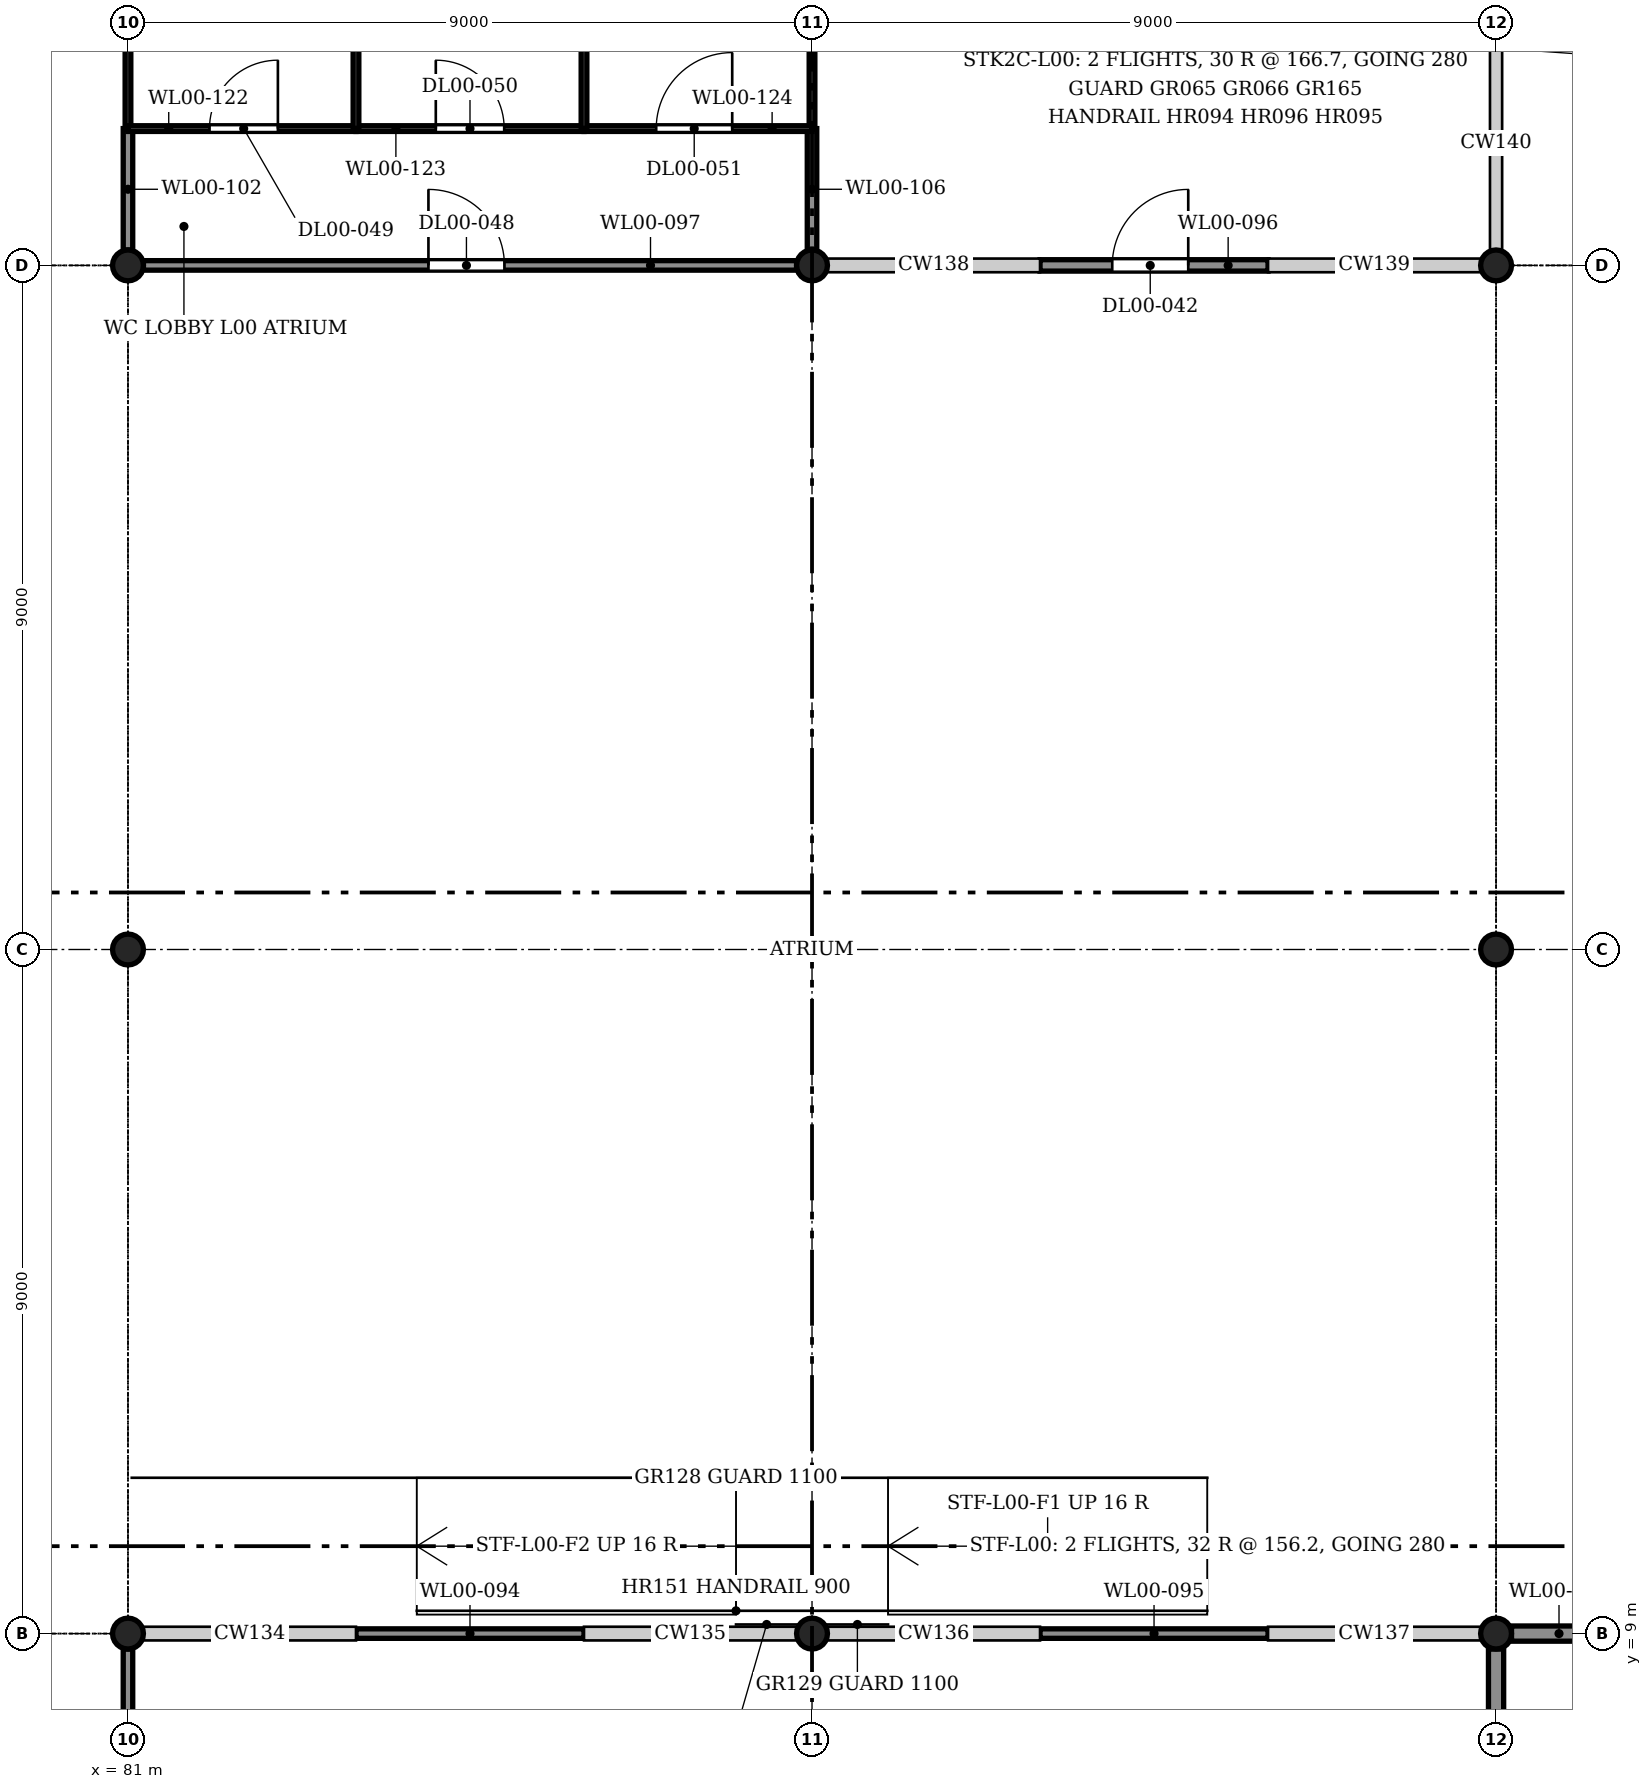
"""IFC4 building model, lengths in metres.
Left out: names, types, materials, properties, quantities, classifications, styles, units other than length and angle.
Written with IfcOpenShell. Run it as: python <this file> out.ifc"""

import sys

from ifc_helpers import new_model, si_unit, direction, frame, frame_2d, origin, origin_2d, place, context, subcontext, project, spatial, rectangle, hollow_circle, extrude, element, fill, save


model = new_model("IFC4")
c1 = context("Model", 3, precision=1e-05, world=origin(), true_north=direction((0.0, 1.0)))
c2 = subcontext(c1, "Body", "Model", "MODEL_VIEW")
j1 = project(units=[si_unit("LENGTHUNIT", "METRE"), si_unit("PLANEANGLEUNIT", "RADIAN")], contexts=[c1])
p1 = place(None, origin())
s1 = spatial("IfcSite", under=j1, at=p1, CompositionType="ELEMENT")
p2 = place(p1, origin())
s2 = spatial("IfcBuilding", under=s1, at=p2, CompositionType="ELEMENT")
p3 = place(p2, origin())
s3 = spatial("IfcBuildingStorey", under=s2, at=p3, CompositionType="ELEMENT", Elevation=0.0)
for number, where, z_axis, x_axis in (
    (1, (81.0, 9.0, 0.0), (0.0, 0.0, 1.0), (1.0, 0.0, 0.0)),
    (2, (90.0, 9.0, 0.0), (0.0, 0.0, 1.0), (1.0, 0.0, 0.0)),
    (3, (99.0, 9.0, 0.0), (0.0, 0.0, 1.0), (1.0, 0.0, 0.0)),
    (4, (81.0, 18.0, 0.0), (0.0, 0.0, 1.0), (1.0, 0.0, 0.0)),
    (5, (99.0, 18.0, 0.0), (0.0, 0.0, 1.0), (1.0, 0.0, 0.0)),
    (6, (81.0, 27.0, 0.0), (0.0, 0.0, 1.0), (1.0, 0.0, 0.0)),
    (7, (90.0, 27.0, 0.0), (0.0, 0.0, 1.0), (1.0, 0.0, 0.0)),
    (8, (99.0, 27.0, 0.0), (0.0, 0.0, 1.0), (1.0, 0.0, 0.0)),
):
    element("IfcColumn", number, at=place(p3, frame(where, z_axis=z_axis, x_axis=x_axis)), inside=s3, PredefinedType="COLUMN", context=c2, shape_type="SweptSolid", body=[
        extrude(hollow_circle(Radius=0.203, WallThickness=0.013, at=origin_2d()), origin(), (0.0, 0.0, 1.0), 5.0),
    ])
for number, where, z_axis, x_axis in (
    (9, (84.0, 9.0, 0.0), (0.0, 0.0, 1.0), (1.0, 0.0, 0.0)),
    (10, (93.0, 9.0, 0.0), (0.0, 0.0, 1.0), (1.0, 0.0, 0.0)),
):
    element("IfcWall", number, at=place(p3, frame(where, z_axis=z_axis, x_axis=x_axis)), inside=s3, PredefinedType="PARTITIONING", context=c2, shape_type="SweptSolid", body=[
        extrude(rectangle(XDim=3.0, YDim=0.125, at=frame_2d((1.5, 0.0))), origin(), (0.0, 0.0, 1.0), 4.228),
    ])
p4 = place(p3, frame((93.0, 27.0, 0.0), z_axis=(0.0, 0.0, 1.0), x_axis=(1.0, 0.0, 0.0)))
e11 = element("IfcWall", 11, at=p4, inside=s3, PredefinedType="PARTITIONING", context=c2, shape_type="SweptSolid", body=[
    extrude(rectangle(XDim=3.0, YDim=0.15, at=frame_2d((1.5, 0.0))), origin(), (0.0, 0.0, 1.0), 4.228),
])
p5 = place(p4, frame((0.95, 0.0, 0.0)))
e12 = element("IfcOpeningElement", 12, at=p5, cuts=e11, PredefinedType="OPENING", context=c2, shape_type="SweptSolid", body=[
    extrude(rectangle(XDim=1.0, YDim=2.1, at=frame_2d((0.5, 1.05))), frame((0.0, 0.085, 0.0), z_axis=(0.0, -1.0, 0.0), x_axis=(1.0, 0.0, 0.0)), (0.0, 0.0, 1.0), 0.17),
])
p6 = place(p3, frame((81.203, 27.0, 0.0), z_axis=(0.0, 0.0, 1.0), x_axis=(1.0, 0.0, 0.0)))
e13 = element("IfcWall", 13, at=p6, inside=s3, PredefinedType="PARTITIONING", context=c2, shape_type="SweptSolid", body=[
    extrude(rectangle(XDim=8.594, YDim=0.125, at=frame_2d((4.297, 0.0))), origin(), (0.0, 0.0, 1.0), 4.228),
])
p7 = place(p6, frame((3.75, 0.0, 0.0)))
e14 = element("IfcOpeningElement", 14, at=p7, cuts=e13, PredefinedType="OPENING", context=c2, shape_type="SweptSolid", body=[
    extrude(rectangle(XDim=1.0, YDim=2.1, at=frame_2d((0.5, 1.05))), frame((0.0, 0.073, 0.0), z_axis=(0.0, -1.0, 0.0), x_axis=(1.0, 0.0, 0.0)), (0.0, 0.0, 1.0), 0.145),
])
p8 = place(p3, frame((99.203, 9.0, 0.0), z_axis=(0.0, 0.0, 1.0), x_axis=(1.0, 0.0, 0.0)))
e15 = element("IfcWall", 15, at=p8, inside=s3, PredefinedType="PARTITIONING", context=c2, shape_type="SweptSolid", body=[
    extrude(rectangle(XDim=4.297, YDim=0.2, at=frame_2d((2.148, 0.0))), origin(), (0.0, 0.0, 1.0), 4.302),
])
p9 = place(p8, frame((1.25, 0.0, 0.0)))
e16 = element("IfcOpeningElement", 16, at=p9, cuts=e15, PredefinedType="OPENING", context=c2, shape_type="SweptSolid", body=[
    extrude(rectangle(XDim=1.8, YDim=2.1, at=frame_2d((0.9, 1.05))), frame((0.0, 0.11, 0.0), z_axis=(0.0, -1.0, 0.0), x_axis=(1.0, 0.0, 0.0)), (0.0, 0.0, 1.0), 0.22),
])
p10 = place(p3, frame((81.0, 0.175, 0.0), z_axis=(0.0, 0.0, 1.0), x_axis=(0.0, 1.0, 0.0)))
e17 = element("IfcWall", 17, at=p10, inside=s3, PredefinedType="PARTITIONING", context=c2, shape_type="SweptSolid", body=[
    extrude(rectangle(XDim=8.622, YDim=0.125, at=frame_2d((4.311, 0.0))), origin(), (0.0, 0.0, 1.0), 4.302),
])
p11 = place(p10, frame((2.05, 0.0, 0.0)))
e18 = element("IfcOpeningElement", 18, at=p11, cuts=e17, PredefinedType="OPENING", context=c2, shape_type="SweptSolid", body=[
    extrude(rectangle(XDim=1.0, YDim=2.1, at=frame_2d((0.5, 1.05))), frame((0.0, 0.073, 0.0), z_axis=(0.0, -1.0, 0.0), x_axis=(1.0, 0.0, 0.0)), (0.0, 0.0, 1.0), 0.145),
])
p12 = place(p3, frame((99.0, 0.175, 0.0), z_axis=(0.0, 0.0, 1.0), x_axis=(0.0, 1.0, 0.0)))
e19 = element("IfcWall", 19, at=p12, inside=s3, PredefinedType="PARTITIONING", context=c2, shape_type="SweptSolid", body=[
    extrude(rectangle(XDim=8.622, YDim=0.2, at=frame_2d((4.311, 0.0))), origin(), (0.0, 0.0, 1.0), 4.302),
])
p13 = place(p3, frame((81.0, 27.203, 0.0), z_axis=(0.0, 0.0, 1.0), x_axis=(0.0, 1.0, 0.0)))
e20 = element("IfcWall", 20, at=p13, inside=s3, PredefinedType="PARTITIONING", context=c2, shape_type="SweptSolid", body=[
    extrude(rectangle(XDim=1.597, YDim=0.125, at=frame_2d((0.798, 0.0))), origin(), (0.0, 0.0, 1.0), 4.302),
])
p14 = place(p3, frame((81.0, 28.8, 0.0), z_axis=(0.0, 0.0, 1.0), x_axis=(0.0, 1.0, 0.0)))
e21 = element("IfcWall", 21, at=p14, inside=s3, PredefinedType="PARTITIONING", context=c2, shape_type="SweptSolid", body=[
    extrude(rectangle(XDim=7.031, YDim=0.075, at=frame_2d((3.515, 0.0))), origin(), (0.0, 0.0, 1.0), 4.302),
])
p15 = place(p3, frame((90.0, 27.203, 0.0), z_axis=(0.0, 0.0, 1.0), x_axis=(0.0, 1.0, 0.0)))
e22 = element("IfcWall", 22, at=p15, inside=s3, PredefinedType="PARTITIONING", context=c2, shape_type="SweptSolid", body=[
    extrude(rectangle(XDim=1.597, YDim=0.125, at=frame_2d((0.798, 0.0))), origin(), (0.0, 0.0, 1.0), 4.302),
])
p16 = place(p3, frame((90.0, 28.8, 0.0), z_axis=(0.0, 0.0, 1.0), x_axis=(0.0, 1.0, 0.0)))
e23 = element("IfcWall", 23, at=p16, inside=s3, PredefinedType="PARTITIONING", context=c2, shape_type="SweptSolid", body=[
    extrude(rectangle(XDim=7.036, YDim=0.075, at=frame_2d((3.518, 0.0))), origin(), (0.0, 0.0, 1.0), 4.302),
])
p17 = place(p3, frame((81.0, 28.8, 0.0), z_axis=(0.0, 0.0, 1.0), x_axis=(1.0, 0.0, 0.0)))
e24 = element("IfcWall", 24, at=p17, inside=s3, PredefinedType="PARTITIONING", context=c2, shape_type="SweptSolid", body=[
    extrude(rectangle(XDim=3.0, YDim=0.075, at=frame_2d((1.5, 0.0))), origin(), (0.0, 0.0, 1.0), 4.302),
])
p18 = place(p17, frame((1.073, 0.0, 0.0)))
e25 = element("IfcOpeningElement", 25, at=p18, cuts=e24, PredefinedType="OPENING", context=c2, shape_type="SweptSolid", body=[
    extrude(rectangle(XDim=0.9, YDim=2.1, at=frame_2d((0.45, 1.05))), frame((0.0, 0.047, 0.0), z_axis=(0.0, -1.0, 0.0), x_axis=(1.0, 0.0, 0.0)), (0.0, 0.0, 1.0), 0.095),
])
p19 = place(p3, frame((84.0, 28.8, 0.0), z_axis=(0.0, 0.0, 1.0), x_axis=(1.0, 0.0, 0.0)))
e26 = element("IfcWall", 26, at=p19, inside=s3, PredefinedType="PARTITIONING", context=c2, shape_type="SweptSolid", body=[
    extrude(rectangle(XDim=3.0, YDim=0.075, at=frame_2d((1.5, 0.0))), origin(), (0.0, 0.0, 1.0), 4.429),
])
p20 = place(p19, frame((1.05, 0.0, 0.0)))
e27 = element("IfcOpeningElement", 27, at=p20, cuts=e26, PredefinedType="OPENING", context=c2, shape_type="SweptSolid", body=[
    extrude(rectangle(XDim=0.9, YDim=2.1, at=frame_2d((0.45, 1.05))), frame((0.0, 0.047, 0.0), z_axis=(0.0, -1.0, 0.0), x_axis=(1.0, 0.0, 0.0)), (0.0, 0.0, 1.0), 0.095),
])
p21 = place(p3, frame((87.0, 28.8, 0.0), z_axis=(0.0, 0.0, 1.0), x_axis=(1.0, 0.0, 0.0)))
e28 = element("IfcWall", 28, at=p21, inside=s3, PredefinedType="PARTITIONING", context=c2, shape_type="SweptSolid", body=[
    extrude(rectangle(XDim=3.0, YDim=0.075, at=frame_2d((1.5, 0.0))), origin(), (0.0, 0.0, 1.0), 4.302),
])
p22 = place(p21, frame((0.95, 0.0, 0.0)))
e29 = element("IfcOpeningElement", 29, at=p22, cuts=e28, PredefinedType="OPENING", context=c2, shape_type="SweptSolid", body=[
    extrude(rectangle(XDim=1.0, YDim=2.1, at=frame_2d((0.5, 1.05))), frame((0.0, 0.047, 0.0), z_axis=(0.0, -1.0, 0.0), x_axis=(1.0, 0.0, 0.0)), (0.0, 0.0, 1.0), 0.095),
])
for number, where, z_axis, x_axis in (
    (30, (84.0, 28.8, 0.0), (0.0, 0.0, 1.0), (0.0, 1.0, 0.0)),
    (31, (87.0, 28.8, 0.0), (0.0, 0.0, 1.0), (0.0, 1.0, 0.0)),
):
    element("IfcWall", number, at=place(p3, frame(where, z_axis=z_axis, x_axis=x_axis)), inside=s3, PredefinedType="PARTITIONING", context=c2, shape_type="SweptSolid", body=[
        extrude(rectangle(XDim=7.2, YDim=0.075, at=frame_2d((3.6, 0.0))), origin(), (0.0, 0.0, 1.0), 3.958),
    ])
p23 = place(p5, origin())
e32 = element("IfcDoor", 32, at=p23, inside=s3, OperationType="SINGLE_SWING_LEFT", PredefinedType="DOOR", context=c2, shape_type="SweptSolid", body=[
    extrude(rectangle(XDim=1.0, YDim=2.1, at=frame_2d((0.5, 1.05))), frame((0.0, 0.025, 0.0), z_axis=(0.0, -1.0, 0.0), x_axis=(1.0, 0.0, 0.0)), (0.0, 0.0, 1.0), 0.05),
])
fill(e12, e32)
p24 = place(p7, origin())
e33 = element("IfcDoor", 33, at=p24, inside=s3, OperationType="SINGLE_SWING_RIGHT", PredefinedType="DOOR", context=c2, shape_type="SweptSolid", body=[
    extrude(rectangle(XDim=1.0, YDim=2.1, at=frame_2d((0.5, 1.05))), frame((0.0, 0.025, 0.0), z_axis=(0.0, -1.0, 0.0), x_axis=(1.0, 0.0, 0.0)), (0.0, 0.0, 1.0), 0.05),
])
fill(e14, e33)
p25 = place(p18, origin())
e34 = element("IfcDoor", 34, at=p25, inside=s3, OperationType="SINGLE_SWING_LEFT", PredefinedType="DOOR", context=c2, shape_type="SweptSolid", body=[
    extrude(rectangle(XDim=0.9, YDim=2.1, at=frame_2d((0.45, 1.05))), frame((0.0, 0.025, 0.0), z_axis=(0.0, -1.0, 0.0), x_axis=(1.0, 0.0, 0.0)), (0.0, 0.0, 1.0), 0.05),
])
fill(e25, e34)
p26 = place(p20, origin())
e35 = element("IfcDoor", 35, at=p26, inside=s3, OperationType="SINGLE_SWING_RIGHT", PredefinedType="DOOR", context=c2, shape_type="SweptSolid", body=[
    extrude(rectangle(XDim=0.9, YDim=2.1, at=frame_2d((0.45, 1.05))), frame((0.0, 0.025, 0.0), z_axis=(0.0, -1.0, 0.0), x_axis=(1.0, 0.0, 0.0)), (0.0, 0.0, 1.0), 0.05),
])
fill(e27, e35)
p27 = place(p22, origin())
e36 = element("IfcDoor", 36, at=p27, inside=s3, OperationType="SINGLE_SWING_LEFT", PredefinedType="DOOR", context=c2, shape_type="SweptSolid", body=[
    extrude(rectangle(XDim=1.0, YDim=2.1, at=frame_2d((0.5, 1.05))), frame((0.0, 0.025, 0.0), z_axis=(0.0, -1.0, 0.0), x_axis=(1.0, 0.0, 0.0)), (0.0, 0.0, 1.0), 0.05),
])
fill(e29, e36)
save(model, sys.argv[1])
